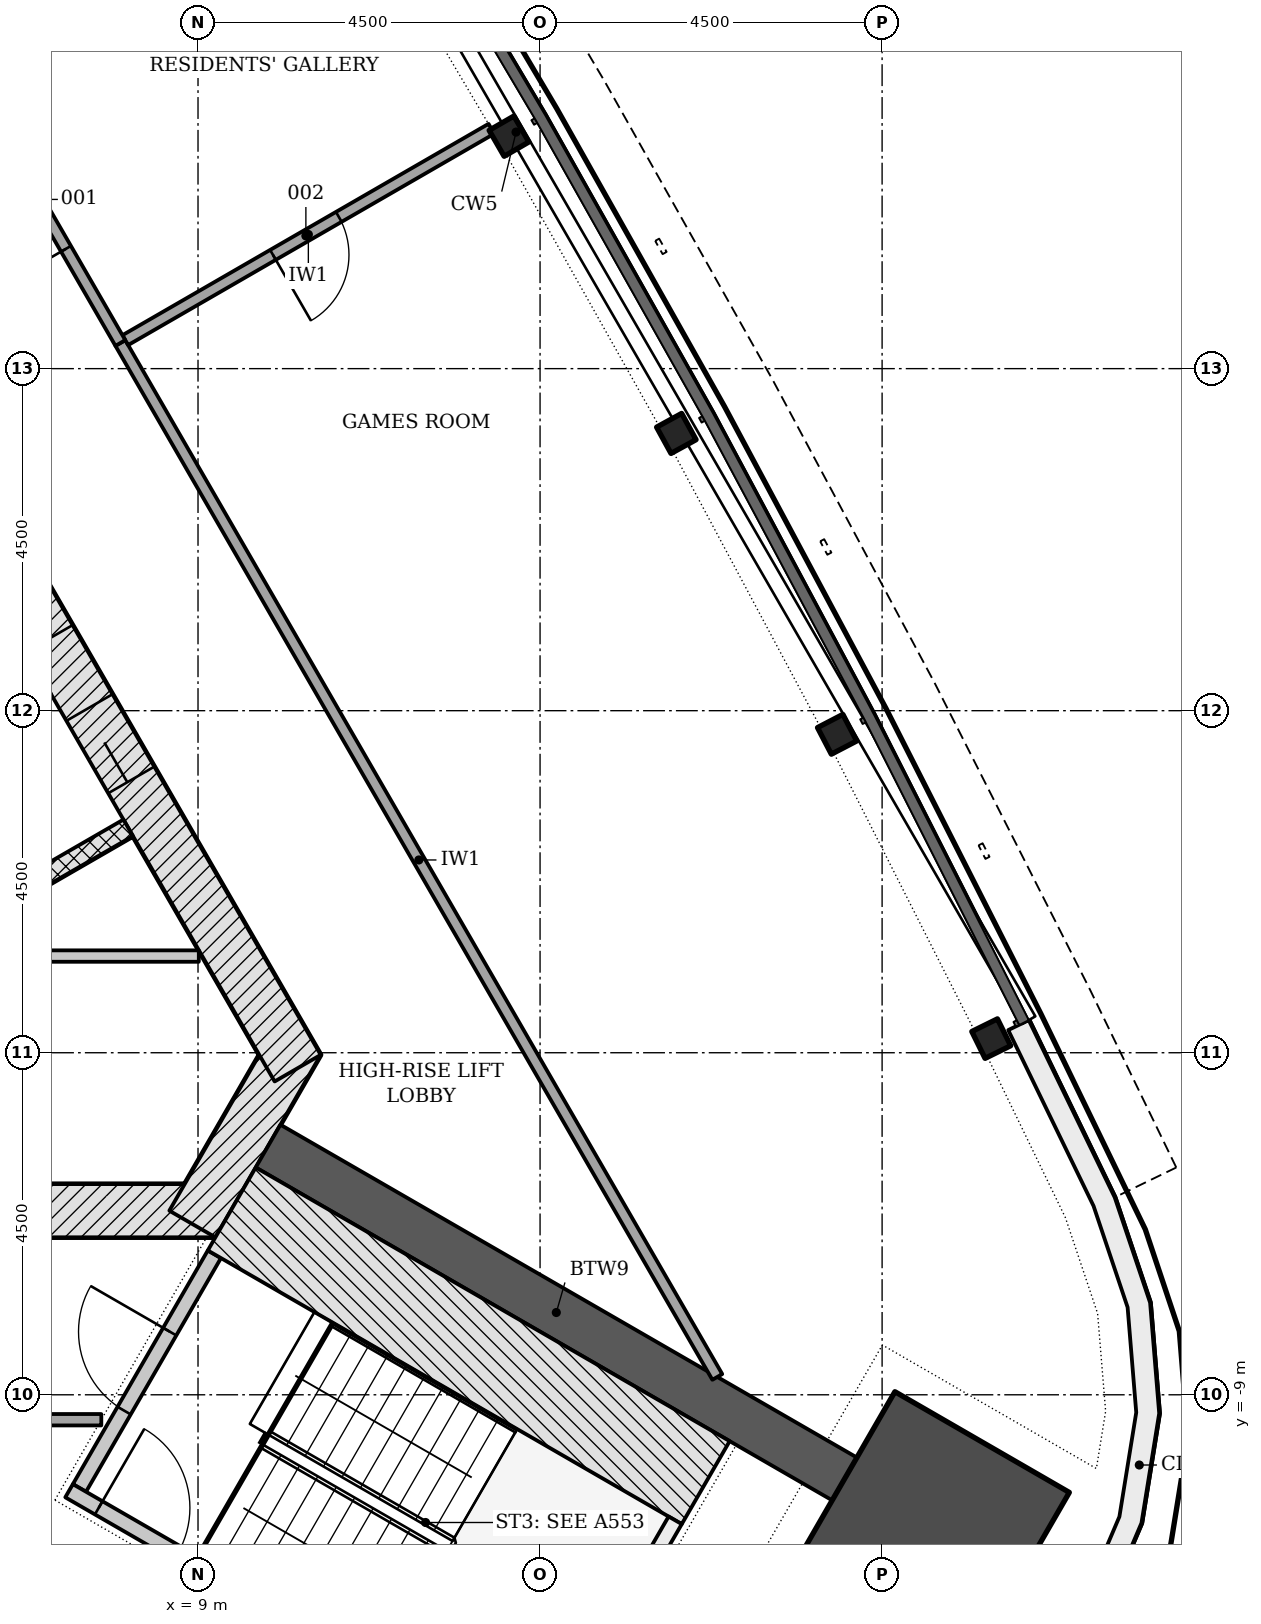
"""IFC4 building model, lengths in metres.
Left out: names, types, materials, properties, quantities, classifications, styles, units other than length and angle.
Written with IfcOpenShell. Run it as: python <this file> out.ifc"""

import sys

from ifc_helpers import new_model, si_unit, direction, frame, frame_2d, origin, origin_2d, place, context, subcontext, project, spatial, polyline, rectangle, i_section, outline, extrude, element, fill, save


model = new_model("IFC4")
c1 = context("Model", 3, precision=1e-05, world=origin(), true_north=direction((0.0, 1.0)))
c2 = subcontext(c1, "Body", "Model", "MODEL_VIEW")
j1 = project(units=[si_unit("LENGTHUNIT", "METRE"), si_unit("PLANEANGLEUNIT", "RADIAN")], contexts=[c1])
p1 = place(None, origin())
s1 = spatial("IfcSite", under=j1, at=p1, CompositionType="ELEMENT")
p2 = place(p1, origin())
s2 = spatial("IfcBuilding", under=s1, at=p2, CompositionType="ELEMENT")
p3 = place(p2, frame((0.0, 0.0, 203.1)))
s3 = spatial("IfcBuildingStorey", under=s2, at=p3, CompositionType="ELEMENT", Elevation=203.1)
p4 = place(p3, frame((-9.229, -6.578, -0.2), z_axis=(0.0, 0.0, 1.0), x_axis=(1.0, 0.0, 0.0)))
e1 = element("IfcWall", 1, at=p4, inside=s3, PredefinedType="SHEAR", context=c2, shape_type="SweptSolid", body=[
    extrude(rectangle(XDim=18.458, YDim=0.7, at=frame_2d((9.229, 0.0))), origin(), (0.0, 0.0, 1.0), 3.6),
])
p5 = place(p4, frame((8.7, 0.0, 0.2)))
e2 = element("IfcOpeningElement", 2, at=p5, cuts=e1, PredefinedType="OPENING", context=c2, shape_type="SweptSolid", body=[
    extrude(rectangle(XDim=1.0, YDim=2.1, at=frame_2d((0.5, 1.05))), frame((0.0, 0.36, 0.0), z_axis=(0.0, -1.0, 0.0), x_axis=(1.0, 0.0, 0.0)), (0.0, 0.0, 1.0), 0.72),
])
p6 = place(p4, frame((3.99, 0.0, 0.2)))
e3 = element("IfcOpeningElement", 3, at=p6, cuts=e1, PredefinedType="OPENING", context=c2, shape_type="SweptSolid", body=[
    extrude(rectangle(XDim=0.9, YDim=2.1, at=frame_2d((0.45, 1.05))), frame((0.0, 0.36, 0.0), z_axis=(0.0, -1.0, 0.0), x_axis=(1.0, 0.0, 0.0)), (0.0, 0.0, 1.0), 0.72),
])
p7 = place(p4, frame((13.489, 0.0, 0.2)))
e4 = element("IfcOpeningElement", 4, at=p7, cuts=e1, PredefinedType="OPENING", context=c2, shape_type="SweptSolid", body=[
    extrude(rectangle(XDim=1.0, YDim=2.1, at=frame_2d((0.5, 1.05))), frame((0.0, 0.36, 0.0), z_axis=(0.0, -1.0, 0.0), x_axis=(1.0, 0.0, 0.0)), (0.0, 0.0, 1.0), 0.72),
])
p8 = place(p3, frame((8.926, -6.753, -0.2), z_axis=(0.0, 0.0, 1.0), x_axis=(0.500042739161, 0.866000726912, 0.0)))
e5 = element("IfcWall", 5, at=p8, inside=s3, PredefinedType="SHEAR", context=c2, shape_type="SweptSolid", body=[
    extrude(rectangle(XDim=2.771, YDim=0.7, at=frame_2d((1.386, 0.0))), origin(), (0.0, 0.0, 1.0), 3.6),
])
p9 = place(p3, frame((10.311, -4.703, -0.2), z_axis=(0.0, 0.0, 1.0), x_axis=(-0.500001446645, 0.866024568562, 0.0)))
e6 = element("IfcWall", 6, at=p9, inside=s3, PredefinedType="SHEAR", context=c2, shape_type="SweptSolid", body=[
    extrude(rectangle(XDim=18.458, YDim=0.7, at=frame_2d((9.229, 0.0))), origin(), (0.0, 0.0, 1.0), 3.6),
])
p10 = place(p9, frame((4.379, 0.0, 0.2)))
e7 = element("IfcOpeningElement", 7, at=p10, cuts=e6, PredefinedType="OPENING", context=c2, shape_type="SweptSolid", body=[
    extrude(rectangle(XDim=1.1, YDim=2.1, at=frame_2d((0.55, 1.05))), frame((0.0, 0.36, 0.0), z_axis=(0.0, -1.0, 0.0), x_axis=(1.0, 0.0, 0.0)), (0.0, 0.0, 1.0), 0.72),
])
p11 = place(p9, frame((6.529, 0.0, 0.2)))
e8 = element("IfcOpeningElement", 8, at=p11, cuts=e6, PredefinedType="OPENING", context=c2, shape_type="SweptSolid", body=[
    extrude(rectangle(XDim=1.1, YDim=2.1, at=frame_2d((0.55, 1.05))), frame((0.0, 0.36, 0.0), z_axis=(0.0, -1.0, 0.0), x_axis=(1.0, 0.0, 0.0)), (0.0, 0.0, 1.0), 0.72),
])
p12 = place(p9, frame((8.679, 0.0, 0.2)))
e9 = element("IfcOpeningElement", 9, at=p12, cuts=e6, PredefinedType="OPENING", context=c2, shape_type="SweptSolid", body=[
    extrude(rectangle(XDim=1.1, YDim=2.1, at=frame_2d((0.55, 1.05))), frame((0.0, 0.36, 0.0), z_axis=(0.0, -1.0, 0.0), x_axis=(1.0, 0.0, 0.0)), (0.0, 0.0, 1.0), 0.72),
])
p13 = place(p9, frame((10.829, 0.0, 0.2)))
e10 = element("IfcOpeningElement", 10, at=p13, cuts=e6, PredefinedType="OPENING", context=c2, shape_type="SweptSolid", body=[
    extrude(rectangle(XDim=1.1, YDim=2.1, at=frame_2d((0.55, 1.05))), frame((0.0, 0.36, 0.0), z_axis=(0.0, -1.0, 0.0), x_axis=(1.0, 0.0, 0.0)), (0.0, 0.0, 1.0), 0.72),
])
p14 = place(p9, frame((12.979, 0.0, 0.2)))
e11 = element("IfcOpeningElement", 11, at=p14, cuts=e6, PredefinedType="OPENING", context=c2, shape_type="SweptSolid", body=[
    extrude(rectangle(XDim=1.1, YDim=2.1, at=frame_2d((0.55, 1.05))), frame((0.0, 0.36, 0.0), z_axis=(0.0, -1.0, 0.0), x_axis=(1.0, 0.0, 0.0)), (0.0, 0.0, 1.0), 0.72),
])
p15 = place(p3, frame((9.922, -5.728, -0.2), z_axis=(0.0, 0.0, 1.0), x_axis=(0.866030064713, -0.499991926948, 0.0)))
e12 = element("IfcWall", 12, at=p15, inside=s3, PredefinedType="SHEAR", context=c2, shape_type="SweptSolid", body=[
    extrude(rectangle(XDim=8.758, YDim=0.65, at=frame_2d((4.379, 0.0))), origin(), (0.0, 0.0, 1.0), 3.6),
])
p16 = place(p3, frame((18.653, -10.77, -0.2), z_axis=(0.0, 0.0, 1.0), x_axis=(0.866025403784, -0.5, 0.0)))
e13 = element("IfcColumn", 13, at=p16, inside=s3, PredefinedType="COLUMN", context=c2, shape_type="SweptSolid", body=[
    extrude(rectangle(XDim=2.65, YDim=2.65, at=origin_2d()), origin(), (0.0, 0.0, 1.0), 3.6),
])
for number, where, z_axis, x_axis in (
    (14, (19.436, -4.314, -0.2), (0.0, 0.0, 1.0), (-0.442, 0.897, 0.0)),
    (15, (17.408, -0.311, -0.2), (0.0, 0.0, 1.0), (-0.462, 0.887, 0.0)),
    (16, (15.293, 3.647, -0.2), (0.0, 0.0, 1.0), (-0.481, 0.877, 0.0)),
    (17, (13.092, 7.558, -0.2), (0.0, 0.0, 1.0), (-0.5, 0.866, 0.0)),
):
    element("IfcColumn", number, at=place(p3, frame(where, z_axis=z_axis, x_axis=x_axis)), inside=s3, PredefinedType="COLUMN", context=c2, shape_type="SweptSolid", body=[
        extrude(i_section(OverallWidth=0.394, OverallDepth=0.376, WebThickness=0.017, FlangeThickness=0.028, FilletRadius=0.015, at=origin_2d()), origin(), (0.0, 0.0, 1.0), 3.6),
    ])
p17 = place(p3, origin())
e18 = element("IfcWall", 18, at=p17, inside=s3, PredefinedType="NOTDEFINED", context=c2, shape_type="SweptSolid", body=[
    extrude(outline(polyline([(13.49, -15.224), (16.075, -15.037), (17.508, -14.748), (18.829, -14.123), (19.961, -13.2), (20.84, -12.032), (21.412, -10.687), (21.646, -9.245), (21.526, -7.788), (21.06, -6.403), (19.929, -4.071), (19.659, -4.202), (20.782, -6.516), (21.23, -7.849), (21.344, -9.233), (21.122, -10.603), (20.578, -11.881), (19.744, -12.99), (18.667, -13.868), (17.412, -14.461), (16.034, -14.74), (13.469, -14.925), (13.49, -15.224)])), origin(), (0.0, 0.0, 1.0), 3.3),
])
p18 = place(p3, frame((8.081, -1.541, -0.2), z_axis=(0.0, 0.0, 1.0), x_axis=(-0.866022959057, -0.500004234368, 0.0)))
e19 = element("IfcWall", 19, at=p18, inside=s3, PredefinedType="PARTITIONING", context=c2, shape_type="SweptSolid", body=[
    extrude(rectangle(XDim=2.5, YDim=0.25, at=frame_2d((1.25, 0.0))), origin(), (0.0, 0.0, 1.0), 3.6),
])
p19 = place(p3, frame((1.071, -3.228, 0.0), z_axis=(0.0, 0.0, 1.0), x_axis=(1.0, 0.0, 0.0)))
e20 = element("IfcWall", 20, at=p19, inside=s3, PredefinedType="PARTITIONING", context=c2, shape_type="SweptSolid", body=[
    extrude(rectangle(XDim=7.939, YDim=0.15, at=frame_2d((3.97, 0.0))), origin(), (0.0, 0.0, 1.0), 3.4),
])
p20 = place(p3, frame((7.44, -10.226, -0.2), z_axis=(0.0, 0.0, 1.0), x_axis=(0.500022077904, 0.866012656725, 0.0)))
e21 = element("IfcWall", 21, at=p20, inside=s3, PredefinedType="SHEAR", context=c2, shape_type="SweptSolid", body=[
    extrude(rectangle(XDim=3.55, YDim=0.2, at=frame_2d((1.775, 0.0))), origin(), (0.0, 0.0, 1.0), 3.6),
])
p21 = place(p20, frame((1.175, 0.0, 0.2)))
e22 = element("IfcOpeningElement", 22, at=p21, cuts=e21, PredefinedType="OPENING", context=c2, shape_type="SweptSolid", body=[
    extrude(rectangle(XDim=1.2, YDim=2.1, at=frame_2d((0.6, 1.05))), frame((0.0, 0.11, 0.0), z_axis=(0.0, -1.0, 0.0), x_axis=(1.0, 0.0, 0.0)), (0.0, 0.0, 1.0), 0.22),
])
p22 = place(p3, frame((7.304, -10.262, -0.2), z_axis=(0.0, 0.0, 1.0), x_axis=(0.866026594901, -0.49999793692, 0.0)))
e23 = element("IfcWall", 23, at=p22, inside=s3, PredefinedType="SHEAR", context=c2, shape_type="SweptSolid", body=[
    extrude(rectangle(XDim=5.6, YDim=0.2, at=frame_2d((2.8, 0.0))), origin(), (0.0, 0.0, 1.0), 3.6),
])
p23 = place(p22, frame((0.45, 0.0, 0.2)))
e24 = element("IfcOpeningElement", 24, at=p23, cuts=e23, PredefinedType="OPENING", context=c2, shape_type="SweptSolid", body=[
    extrude(rectangle(XDim=1.2, YDim=2.1, at=frame_2d((0.6, 1.05))), frame((0.0, 0.11, 0.0), z_axis=(0.0, -1.0, 0.0), x_axis=(1.0, 0.0, 0.0)), (0.0, 0.0, 1.0), 0.22),
])
p24 = place(p3, frame((9.444, -6.555, -0.2), z_axis=(0.0, 0.0, 1.0), x_axis=(0.866018442252, -0.500012057535, 0.0)))
e25 = element("IfcWall", 25, at=p24, inside=s3, PredefinedType="SHEAR", context=c2, shape_type="SweptSolid", body=[
    extrude(rectangle(XDim=7.2, YDim=1.261, at=frame_2d((3.6, 0.0))), origin(), (0.0, 0.0, 1.0), 3.6),
])
p25 = place(p3, frame((0.0, 0.0, -0.2)))
e26 = element("IfcWall", 26, at=p25, inside=s3, PredefinedType="SHEAR", context=c2, shape_type="SweptSolid", body=[
    extrude(outline(polyline([(12.104, -13.149), (14.289, -12.563), (15.364, -10.701), (15.191, -10.601), (14.157, -12.392), (12.132, -12.934), (12.204, -12.976), (12.204, -12.976), (12.204, -12.976), (12.204, -12.976), (12.204, -12.976), (12.204, -12.976), (12.204, -12.976), (12.204, -12.976), (12.204, -12.976), (12.204, -12.976), (12.204, -12.976), (12.204, -12.976), (12.204, -12.976), (12.204, -12.976), (12.204, -12.976), (12.204, -12.976), (12.204, -12.976), (12.104, -13.149)])), origin(), (0.0, 0.0, 1.0), 3.6),
])
p26 = place(p3, frame((15.832, -8.765, 0.0), z_axis=(0.0, 0.0, 1.0), x_axis=(-0.499997377664, 0.866026917785, 0.0)))
e27 = element("IfcWall", 27, at=p26, inside=s3, PredefinedType="PARTITIONING", context=c2, shape_type="SweptSolid", body=[
    extrude(rectangle(XDim=15.707, YDim=0.15, at=frame_2d((7.854, 0.0))), origin(), (0.0, 0.0, 1.0), 2.852),
])
p27 = place(p3, frame((12.86, 7.656, 0.0), z_axis=(0.0, 0.0, 1.0), x_axis=(-0.866013784358, -0.500020124897, 0.0)))
e28 = element("IfcWall", 28, at=p27, inside=s3, PredefinedType="PARTITIONING", context=c2, shape_type="SweptSolid", body=[
    extrude(rectangle(XDim=5.561, YDim=0.15, at=frame_2d((2.781, 0.0))), origin(), (0.0, 0.0, 1.0), 3.4),
])
p28 = place(p27, frame((2.318, 0.0, 0.0)))
e29 = element("IfcOpeningElement", 29, at=p28, cuts=e28, PredefinedType="OPENING", context=c2, shape_type="SweptSolid", body=[
    extrude(rectangle(XDim=1.0, YDim=2.1, at=frame_2d((0.5, 1.05))), frame((0.0, 0.085, 0.0), z_axis=(0.0, -1.0, 0.0), x_axis=(1.0, 0.0, 0.0)), (0.0, 0.0, 1.0), 0.17),
])
p29 = place(p3, frame((10.571, 11.512, 0.0), z_axis=(0.0, 0.0, 1.0), x_axis=(-0.854873861195, -0.518835890668, 0.0)))
e30 = element("IfcWall", 30, at=p29, inside=s3, PredefinedType="PARTITIONING", context=c2, shape_type="SweptSolid", body=[
    extrude(rectangle(XDim=5.509, YDim=0.15, at=frame_2d((2.755, 0.0))), origin(), (0.0, 0.0, 1.0), 3.4),
])
p30 = place(p29, frame((2.292, 0.0, 0.0)))
e31 = element("IfcOpeningElement", 31, at=p30, cuts=e30, PredefinedType="OPENING", context=c2, shape_type="SweptSolid", body=[
    extrude(rectangle(XDim=1.0, YDim=2.1, at=frame_2d((0.5, 1.05))), frame((0.0, 0.085, 0.0), z_axis=(0.0, -1.0, 0.0), x_axis=(1.0, 0.0, 0.0)), (0.0, 0.0, 1.0), 0.17),
])
p31 = place(p3, frame((7.979, 4.837, 0.0), z_axis=(0.0, 0.0, 1.0), x_axis=(-0.500027674414, 0.866009425365, 0.0)))
e32 = element("IfcWall", 32, at=p31, inside=s3, PredefinedType="PARTITIONING", context=c2, shape_type="SweptSolid", body=[
    extrude(rectangle(XDim=4.362, YDim=0.15, at=frame_2d((2.181, 0.0))), origin(), (0.0, 0.0, 1.0), 2.852),
])
p32 = place(p31, frame((1.431, 0.0, 0.0)))
e33 = element("IfcOpeningElement", 33, at=p32, cuts=e32, PredefinedType="OPENING", context=c2, shape_type="SweptSolid", body=[
    extrude(rectangle(XDim=1.5, YDim=2.1, at=frame_2d((0.75, 1.05))), frame((0.0, 0.085, 0.0), z_axis=(0.0, -1.0, 0.0), x_axis=(1.0, 0.0, 0.0)), (0.0, 0.0, 1.0), 0.17),
])
p33 = place(p3, frame((0.2, -9.328, 0.0), z_axis=(0.0, 0.0, 1.0), x_axis=(1.0, 0.0, 0.0)))
e34 = element("IfcWall", 34, at=p33, inside=s3, PredefinedType="PARTITIONING", context=c2, shape_type="SweptSolid", body=[
    extrude(rectangle(XDim=7.528, YDim=0.15, at=frame_2d((3.764, 0.0))), origin(), (0.0, 0.0, 1.0), 2.852),
])
p34 = place(p33, frame((3.289, 0.0, 0.0)))
e35 = element("IfcOpeningElement", 35, at=p34, cuts=e34, PredefinedType="OPENING", context=c2, shape_type="SweptSolid", body=[
    extrude(rectangle(XDim=1.0, YDim=2.1, at=frame_2d((0.5, 1.05))), frame((0.0, 0.085, 0.0), z_axis=(0.0, -1.0, 0.0), x_axis=(1.0, 0.0, 0.0)), (0.0, 0.0, 1.0), 0.17),
])
p35 = place(p10, origin())
e36 = element("IfcDoor", 36, at=p35, inside=s3, OperationType="DOUBLE_DOOR_SLIDING", PredefinedType="DOOR", context=c2, shape_type="SweptSolid", body=[
    extrude(rectangle(XDim=1.1, YDim=2.1, at=frame_2d((0.55, 1.05))), frame((0.0, 0.025, 0.0), z_axis=(0.0, -1.0, 0.0), x_axis=(1.0, 0.0, 0.0)), (0.0, 0.0, 1.0), 0.05),
])
fill(e7, e36)
p36 = place(p21, origin())
e37 = element("IfcDoor", 37, at=p36, inside=s3, OperationType="SINGLE_SWING_RIGHT", PredefinedType="DOOR", context=c2, shape_type="SweptSolid", body=[
    extrude(rectangle(XDim=1.2, YDim=2.1, at=frame_2d((0.6, 1.05))), frame((0.0, 0.025, 0.0), z_axis=(0.0, -1.0, 0.0), x_axis=(1.0, 0.0, 0.0)), (0.0, 0.0, 1.0), 0.05),
])
fill(e22, e37)
p37 = place(p23, origin())
e38 = element("IfcDoor", 38, at=p37, inside=s3, OperationType="SINGLE_SWING_LEFT", PredefinedType="DOOR", context=c2, shape_type="SweptSolid", body=[
    extrude(rectangle(XDim=1.2, YDim=2.1, at=frame_2d((0.6, 1.05))), frame((0.0, 0.025, 0.0), z_axis=(0.0, -1.0, 0.0), x_axis=(1.0, 0.0, 0.0)), (0.0, 0.0, 1.0), 0.05),
])
fill(e24, e38)
p38 = place(p32, origin())
e39 = element("IfcDoor", 39, at=p38, inside=s3, OperationType="DOUBLE_DOOR_SINGLE_SWING", PredefinedType="DOOR", context=c2, shape_type="SweptSolid", body=[
    extrude(rectangle(XDim=1.5, YDim=2.1, at=frame_2d((0.75, 1.05))), frame((0.0, 0.025, 0.0), z_axis=(0.0, -1.0, 0.0), x_axis=(1.0, 0.0, 0.0)), (0.0, 0.0, 1.0), 0.05),
])
fill(e33, e39)
p39 = place(p28, origin())
e40 = element("IfcDoor", 40, at=p39, inside=s3, OperationType="SINGLE_SWING_RIGHT", PredefinedType="DOOR", context=c2, shape_type="SweptSolid", body=[
    extrude(rectangle(XDim=1.0, YDim=2.1, at=frame_2d((0.5, 1.05))), frame((0.0, 0.025, 0.0), z_axis=(0.0, -1.0, 0.0), x_axis=(1.0, 0.0, 0.0)), (0.0, 0.0, 1.0), 0.05),
])
fill(e29, e40)
save(model, sys.argv[1])
